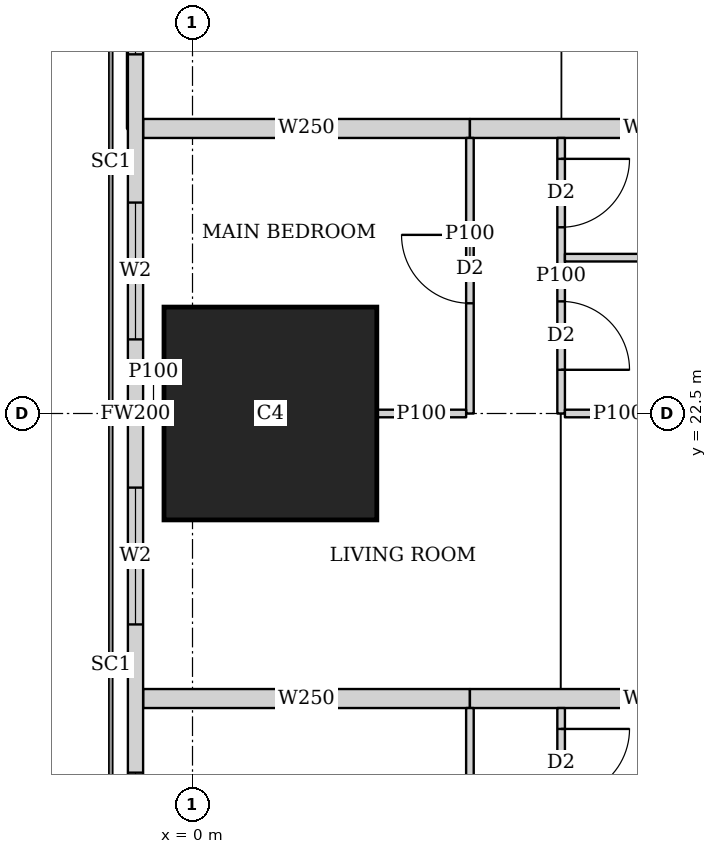
"""IFC4 building model, lengths in metres.
Left out: names, types, materials, properties, quantities, classifications, styles, units other than length and angle.
Written with IfcOpenShell. Run it as: python <this file> out.ifc"""

import sys

from ifc_helpers import new_model, si_unit, direction, frame, frame_2d, origin, origin_2d, place, context, subcontext, project, spatial, rectangle, extrude, element, fill, save


model = new_model("IFC4")
c1 = context("Model", 3, precision=1e-05, world=origin(), true_north=direction((0.0, 1.0)))
c2 = subcontext(c1, "Body", "Model", "MODEL_VIEW")
j1 = project(units=[si_unit("LENGTHUNIT", "METRE"), si_unit("PLANEANGLEUNIT", "RADIAN")], contexts=[c1])
p1 = place(None, origin())
s1 = spatial("IfcSite", under=j1, at=p1, CompositionType="ELEMENT")
p2 = place(p1, origin())
s2 = spatial("IfcBuilding", under=s1, at=p2, CompositionType="ELEMENT")
p3 = place(p2, frame((0.0, 0.0, 65.0)))
s3 = spatial("IfcBuildingStorey", under=s2, at=p3, CompositionType="ELEMENT", Elevation=65.0)
p4 = place(p3, frame((1.025, 22.5, 0.0), z_axis=(0.0, 0.0, 1.0), x_axis=(1.0, 0.0, 0.0)))
e1 = element("IfcColumn", 1, at=p4, inside=s3, PredefinedType="COLUMN", context=c2, shape_type="SweptSolid", body=[
    extrude(rectangle(XDim=2.8, YDim=2.8, at=origin_2d()), origin(), (0.0, 0.0, 1.0), 3.75),
])
p5 = place(p3, frame((-0.75, 42.837, 0.0), z_axis=(0.0, 0.0, 1.0), x_axis=(0.0, -1.0, 0.0)))
e2 = element("IfcWall", 2, at=p5, inside=s3, PredefinedType="SOLIDWALL", context=c2, shape_type="SweptSolid", body=[
    extrude(rectangle(XDim=40.674, YDim=0.2, at=frame_2d((20.337, 0.0))), origin(), (0.0, 0.0, 1.0), 3.5),
])
p6 = place(p5, frame((1.78, 0.0, 0.9)))
e3 = element("IfcOpeningElement", 3, at=p6, cuts=e2, PredefinedType="OPENING", context=c2, shape_type="SweptSolid", body=[
    extrude(rectangle(XDim=1.8, YDim=1.5, at=frame_2d((0.9, 0.75))), frame((0.0, 0.11, 0.0), z_axis=(0.0, -1.0, 0.0), x_axis=(1.0, 0.0, 0.0)), (0.0, 0.0, 1.0), 0.22),
])
p7 = place(p5, frame((6.312, 0.0, 0.9)))
e4 = element("IfcOpeningElement", 4, at=p7, cuts=e2, PredefinedType="OPENING", context=c2, shape_type="SweptSolid", body=[
    extrude(rectangle(XDim=1.8, YDim=1.5, at=frame_2d((0.9, 0.75))), frame((0.0, 0.11, 0.0), z_axis=(0.0, -1.0, 0.0), x_axis=(1.0, 0.0, 0.0)), (0.0, 0.0, 1.0), 0.22),
])
p8 = place(p5, frame((10.062, 0.0, 0.9)))
e5 = element("IfcOpeningElement", 5, at=p8, cuts=e2, PredefinedType="OPENING", context=c2, shape_type="SweptSolid", body=[
    extrude(rectangle(XDim=1.8, YDim=1.5, at=frame_2d((0.9, 0.75))), frame((0.0, 0.11, 0.0), z_axis=(0.0, -1.0, 0.0), x_axis=(1.0, 0.0, 0.0)), (0.0, 0.0, 1.0), 0.22),
])
p9 = place(p5, frame((13.812, 0.0, 0.9)))
e6 = element("IfcOpeningElement", 6, at=p9, cuts=e2, PredefinedType="OPENING", context=c2, shape_type="SweptSolid", body=[
    extrude(rectangle(XDim=1.8, YDim=1.5, at=frame_2d((0.9, 0.75))), frame((0.0, 0.11, 0.0), z_axis=(0.0, -1.0, 0.0), x_axis=(1.0, 0.0, 0.0)), (0.0, 0.0, 1.0), 0.22),
])
p10 = place(p5, frame((17.562, 0.0, 0.9)))
e7 = element("IfcOpeningElement", 7, at=p10, cuts=e2, PredefinedType="OPENING", context=c2, shape_type="SweptSolid", body=[
    extrude(rectangle(XDim=1.8, YDim=1.5, at=frame_2d((0.9, 0.75))), frame((0.0, 0.11, 0.0), z_axis=(0.0, -1.0, 0.0), x_axis=(1.0, 0.0, 0.0)), (0.0, 0.0, 1.0), 0.22),
])
p11 = place(p5, frame((21.312, 0.0, 0.9)))
e8 = element("IfcOpeningElement", 8, at=p11, cuts=e2, PredefinedType="OPENING", context=c2, shape_type="SweptSolid", body=[
    extrude(rectangle(XDim=1.8, YDim=1.5, at=frame_2d((0.9, 0.75))), frame((0.0, 0.11, 0.0), z_axis=(0.0, -1.0, 0.0), x_axis=(1.0, 0.0, 0.0)), (0.0, 0.0, 1.0), 0.22),
])
p12 = place(p5, frame((25.062, 0.0, 0.9)))
e9 = element("IfcOpeningElement", 9, at=p12, cuts=e2, PredefinedType="OPENING", context=c2, shape_type="SweptSolid", body=[
    extrude(rectangle(XDim=1.8, YDim=1.5, at=frame_2d((0.9, 0.75))), frame((0.0, 0.11, 0.0), z_axis=(0.0, -1.0, 0.0), x_axis=(1.0, 0.0, 0.0)), (0.0, 0.0, 1.0), 0.22),
])
p13 = place(p5, frame((28.812, 0.0, 0.9)))
e10 = element("IfcOpeningElement", 10, at=p13, cuts=e2, PredefinedType="OPENING", context=c2, shape_type="SweptSolid", body=[
    extrude(rectangle(XDim=1.8, YDim=1.5, at=frame_2d((0.9, 0.75))), frame((0.0, 0.11, 0.0), z_axis=(0.0, -1.0, 0.0), x_axis=(1.0, 0.0, 0.0)), (0.0, 0.0, 1.0), 0.22),
])
p14 = place(p5, frame((32.562, 0.0, 0.9)))
e11 = element("IfcOpeningElement", 11, at=p14, cuts=e2, PredefinedType="OPENING", context=c2, shape_type="SweptSolid", body=[
    extrude(rectangle(XDim=1.8, YDim=1.5, at=frame_2d((0.9, 0.75))), frame((0.0, 0.11, 0.0), z_axis=(0.0, -1.0, 0.0), x_axis=(1.0, 0.0, 0.0)), (0.0, 0.0, 1.0), 0.22),
])
p15 = place(p5, frame((37.094, 0.0, 0.9)))
e12 = element("IfcOpeningElement", 12, at=p15, cuts=e2, PredefinedType="OPENING", context=c2, shape_type="SweptSolid", body=[
    extrude(rectangle(XDim=1.8, YDim=1.5, at=frame_2d((0.9, 0.75))), frame((0.0, 0.11, 0.0), z_axis=(0.0, -1.0, 0.0), x_axis=(1.0, 0.0, 0.0)), (0.0, 0.0, 1.0), 0.22),
])
p16 = place(p3, frame((3.65, 15.0, 0.0), z_axis=(0.0, 0.0, 1.0), x_axis=(0.0, 1.0, 0.0)))
e13 = element("IfcWall", 13, at=p16, inside=s3, PredefinedType="PARTITIONING", context=c2, shape_type="SweptSolid", body=[
    extrude(rectangle(XDim=3.625, YDim=0.1, at=frame_2d((1.812, 0.0))), origin(), (0.0, 0.0, 1.0), 3.5),
])
p17 = place(p16, frame((1.45, 0.0, 0.0)))
e14 = element("IfcOpeningElement", 14, at=p17, cuts=e13, PredefinedType="OPENING", context=c2, shape_type="SweptSolid", body=[
    extrude(rectangle(XDim=0.9, YDim=2.1, at=frame_2d((0.45, 1.05))), frame((0.0, 0.06, 0.0), z_axis=(0.0, -1.0, 0.0), x_axis=(1.0, 0.0, 0.0)), (0.0, 0.0, 1.0), 0.12),
])
p18 = place(p3, frame((4.85, 15.0, 0.0), z_axis=(0.0, 0.0, 1.0), x_axis=(0.0, 1.0, 0.0)))
e15 = element("IfcWall", 15, at=p18, inside=s3, PredefinedType="PARTITIONING", context=c2, shape_type="SweptSolid", body=[
    extrude(rectangle(XDim=3.625, YDim=0.1, at=frame_2d((1.812, 0.0))), origin(), (0.0, 0.0, 1.0), 3.5),
])
p19 = place(p18, frame((0.575, 0.0, 0.0)))
e16 = element("IfcOpeningElement", 16, at=p19, cuts=e15, PredefinedType="OPENING", context=c2, shape_type="SweptSolid", body=[
    extrude(rectangle(XDim=0.9, YDim=2.1, at=frame_2d((0.45, 1.05))), frame((0.0, 0.06, 0.0), z_axis=(0.0, -1.0, 0.0), x_axis=(1.0, 0.0, 0.0)), (0.0, 0.0, 1.0), 0.12),
])
p20 = place(p18, frame((2.45, 0.0, 0.0)))
e17 = element("IfcOpeningElement", 17, at=p20, cuts=e15, PredefinedType="OPENING", context=c2, shape_type="SweptSolid", body=[
    extrude(rectangle(XDim=0.9, YDim=2.1, at=frame_2d((0.45, 1.05))), frame((0.0, 0.06, 0.0), z_axis=(0.0, -1.0, 0.0), x_axis=(1.0, 0.0, 0.0)), (0.0, 0.0, 1.0), 0.12),
])
p21 = place(p3, frame((3.65, 22.5, 0.0), z_axis=(0.0, 0.0, 1.0), x_axis=(0.0, 1.0, 0.0)))
e18 = element("IfcWall", 18, at=p21, inside=s3, PredefinedType="PARTITIONING", context=c2, shape_type="SweptSolid", body=[
    extrude(rectangle(XDim=3.625, YDim=0.1, at=frame_2d((1.812, 0.0))), origin(), (0.0, 0.0, 1.0), 3.5),
])
p22 = place(p21, frame((1.45, 0.0, 0.0)))
e19 = element("IfcOpeningElement", 19, at=p22, cuts=e18, PredefinedType="OPENING", context=c2, shape_type="SweptSolid", body=[
    extrude(rectangle(XDim=0.9, YDim=2.1, at=frame_2d((0.45, 1.05))), frame((0.0, 0.06, 0.0), z_axis=(0.0, -1.0, 0.0), x_axis=(1.0, 0.0, 0.0)), (0.0, 0.0, 1.0), 0.12),
])
p23 = place(p3, frame((4.85, 22.5, 0.0), z_axis=(0.0, 0.0, 1.0), x_axis=(0.0, 1.0, 0.0)))
e20 = element("IfcWall", 20, at=p23, inside=s3, PredefinedType="PARTITIONING", context=c2, shape_type="SweptSolid", body=[
    extrude(rectangle(XDim=3.625, YDim=0.1, at=frame_2d((1.812, 0.0))), origin(), (0.0, 0.0, 1.0), 3.5),
])
p24 = place(p23, frame((0.575, 0.0, 0.0)))
e21 = element("IfcOpeningElement", 21, at=p24, cuts=e20, PredefinedType="OPENING", context=c2, shape_type="SweptSolid", body=[
    extrude(rectangle(XDim=0.9, YDim=2.1, at=frame_2d((0.45, 1.05))), frame((0.0, 0.06, 0.0), z_axis=(0.0, -1.0, 0.0), x_axis=(1.0, 0.0, 0.0)), (0.0, 0.0, 1.0), 0.12),
])
p25 = place(p23, frame((2.45, 0.0, 0.0)))
e22 = element("IfcOpeningElement", 22, at=p25, cuts=e20, PredefinedType="OPENING", context=c2, shape_type="SweptSolid", body=[
    extrude(rectangle(XDim=0.9, YDim=2.1, at=frame_2d((0.45, 1.05))), frame((0.0, 0.06, 0.0), z_axis=(0.0, -1.0, 0.0), x_axis=(1.0, 0.0, 0.0)), (0.0, 0.0, 1.0), 0.12),
])
p26 = place(p3, frame((-0.65, 22.5, 0.0), z_axis=(0.0, 0.0, 1.0), x_axis=(1.0, 0.0, 0.0)))
e23 = element("IfcWall", 23, at=p26, inside=s3, PredefinedType="PARTITIONING", context=c2, shape_type="SweptSolid", body=[
    extrude(rectangle(XDim=0.274, YDim=0.1, at=frame_2d((0.137, 0.0))), origin(), (0.0, 0.0, 1.0), 3.5),
])
p27 = place(p3, frame((2.426, 22.5, 0.0), z_axis=(0.0, 0.0, 1.0), x_axis=(1.0, 0.0, 0.0)))
e24 = element("IfcWall", 24, at=p27, inside=s3, PredefinedType="PARTITIONING", context=c2, shape_type="SweptSolid", body=[
    extrude(rectangle(XDim=1.174, YDim=0.1, at=frame_2d((0.587, 0.0))), origin(), (0.0, 0.0, 1.0), 3.5),
])
p28 = place(p3, frame((4.9, 22.5, 0.0), z_axis=(0.0, 0.0, 1.0), x_axis=(1.0, 0.0, 0.0)))
e25 = element("IfcWall", 25, at=p28, inside=s3, PredefinedType="PARTITIONING", context=c2, shape_type="SweptSolid", body=[
    extrude(rectangle(XDim=1.399, YDim=0.1, at=frame_2d((0.7, 0.0))), origin(), (0.0, 0.0, 1.0), 3.5),
])
p29 = place(p3, frame((4.9, 24.55, 0.0), z_axis=(0.0, 0.0, 1.0), x_axis=(1.0, 0.0, 0.0)))
e26 = element("IfcWall", 26, at=p29, inside=s3, PredefinedType="PARTITIONING", context=c2, shape_type="SweptSolid", body=[
    extrude(rectangle(XDim=3.525, YDim=0.1, at=frame_2d((1.763, 0.0))), origin(), (0.0, 0.0, 1.0), 3.5),
])
p30 = place(p3, frame((-0.65, 18.75, 0.0), z_axis=(0.0, 0.0, 1.0), x_axis=(1.0, 0.0, 0.0)))
e27 = element("IfcWall", 27, at=p30, inside=s3, PredefinedType="SOLIDWALL", context=c2, shape_type="SweptSolid", body=[
    extrude(rectangle(XDim=4.3, YDim=0.25, at=frame_2d((2.15, 0.0))), origin(), (0.0, 0.0, 1.0), 2.05),
])
p31 = place(p3, frame((3.65, 18.75, 0.0), z_axis=(0.0, 0.0, 1.0), x_axis=(1.0, 0.0, 0.0)))
e28 = element("IfcWall", 28, at=p31, inside=s3, PredefinedType="SOLIDWALL", context=c2, shape_type="SweptSolid", body=[
    extrude(rectangle(XDim=4.775, YDim=0.25, at=frame_2d((2.388, 0.0))), origin(), (0.0, 0.0, 1.0), 3.5),
])
p32 = place(p3, frame((-0.65, 26.25, 0.0), z_axis=(0.0, 0.0, 1.0), x_axis=(1.0, 0.0, 0.0)))
e29 = element("IfcWall", 29, at=p32, inside=s3, PredefinedType="SOLIDWALL", context=c2, shape_type="SweptSolid", body=[
    extrude(rectangle(XDim=4.3, YDim=0.25, at=frame_2d((2.15, 0.0))), origin(), (0.0, 0.0, 1.0), 2.05),
])
p33 = place(p3, frame((3.65, 26.25, 0.0), z_axis=(0.0, 0.0, 1.0), x_axis=(1.0, 0.0, 0.0)))
e30 = element("IfcWall", 30, at=p33, inside=s3, PredefinedType="SOLIDWALL", context=c2, shape_type="SweptSolid", body=[
    extrude(rectangle(XDim=4.775, YDim=0.25, at=frame_2d((2.388, 0.0))), origin(), (0.0, 0.0, 1.0), 3.5),
])
p34 = place(p9, origin())
e31 = element("IfcWindow", 31, at=p34, inside=s3, PartitioningType="SINGLE_PANEL", PredefinedType="WINDOW", context=c2, shape_type="SweptSolid", body=[
    extrude(rectangle(XDim=1.8, YDim=1.5, at=frame_2d((0.9, 0.75))), frame((0.0, 0.03, 0.0), z_axis=(0.0, -1.0, 0.0), x_axis=(1.0, 0.0, 0.0)), (0.0, 0.0, 1.0), 0.06),
])
fill(e6, e31)
p35 = place(p10, origin())
e32 = element("IfcWindow", 32, at=p35, inside=s3, PartitioningType="SINGLE_PANEL", PredefinedType="WINDOW", context=c2, shape_type="SweptSolid", body=[
    extrude(rectangle(XDim=1.8, YDim=1.5, at=frame_2d((0.9, 0.75))), frame((0.0, 0.03, 0.0), z_axis=(0.0, -1.0, 0.0), x_axis=(1.0, 0.0, 0.0)), (0.0, 0.0, 1.0), 0.06),
])
fill(e7, e32)
p36 = place(p11, origin())
e33 = element("IfcWindow", 33, at=p36, inside=s3, PartitioningType="SINGLE_PANEL", PredefinedType="WINDOW", context=c2, shape_type="SweptSolid", body=[
    extrude(rectangle(XDim=1.8, YDim=1.5, at=frame_2d((0.9, 0.75))), frame((0.0, 0.03, 0.0), z_axis=(0.0, -1.0, 0.0), x_axis=(1.0, 0.0, 0.0)), (0.0, 0.0, 1.0), 0.06),
])
fill(e8, e33)
p37 = place(p12, origin())
e34 = element("IfcWindow", 34, at=p37, inside=s3, PartitioningType="SINGLE_PANEL", PredefinedType="WINDOW", context=c2, shape_type="SweptSolid", body=[
    extrude(rectangle(XDim=1.8, YDim=1.5, at=frame_2d((0.9, 0.75))), frame((0.0, 0.03, 0.0), z_axis=(0.0, -1.0, 0.0), x_axis=(1.0, 0.0, 0.0)), (0.0, 0.0, 1.0), 0.06),
])
fill(e9, e34)
p38 = place(p20, origin())
e35 = element("IfcDoor", 35, at=p38, inside=s3, OperationType="SINGLE_SWING_LEFT", PredefinedType="DOOR", context=c2, shape_type="SweptSolid", body=[
    extrude(rectangle(XDim=0.9, YDim=2.1, at=frame_2d((0.45, 1.05))), frame((0.0, 0.025, 0.0), z_axis=(0.0, -1.0, 0.0), x_axis=(1.0, 0.0, 0.0)), (0.0, 0.0, 1.0), 0.05),
])
fill(e17, e35)
p39 = place(p22, origin())
e36 = element("IfcDoor", 36, at=p39, inside=s3, OperationType="SINGLE_SWING_RIGHT", PredefinedType="DOOR", context=c2, shape_type="SweptSolid", body=[
    extrude(rectangle(XDim=0.9, YDim=2.1, at=frame_2d((0.45, 1.05))), frame((0.0, 0.025, 0.0), z_axis=(0.0, -1.0, 0.0), x_axis=(1.0, 0.0, 0.0)), (0.0, 0.0, 1.0), 0.05),
])
fill(e19, e36)
p40 = place(p24, origin())
e37 = element("IfcDoor", 37, at=p40, inside=s3, OperationType="SINGLE_SWING_RIGHT", PredefinedType="DOOR", context=c2, shape_type="SweptSolid", body=[
    extrude(rectangle(XDim=0.9, YDim=2.1, at=frame_2d((0.45, 1.05))), frame((0.0, 0.025, 0.0), z_axis=(0.0, -1.0, 0.0), x_axis=(1.0, 0.0, 0.0)), (0.0, 0.0, 1.0), 0.05),
])
fill(e21, e37)
p41 = place(p25, origin())
e38 = element("IfcDoor", 38, at=p41, inside=s3, OperationType="SINGLE_SWING_LEFT", PredefinedType="DOOR", context=c2, shape_type="SweptSolid", body=[
    extrude(rectangle(XDim=0.9, YDim=2.1, at=frame_2d((0.45, 1.05))), frame((0.0, 0.025, 0.0), z_axis=(0.0, -1.0, 0.0), x_axis=(1.0, 0.0, 0.0)), (0.0, 0.0, 1.0), 0.05),
])
fill(e22, e38)
save(model, sys.argv[1])
